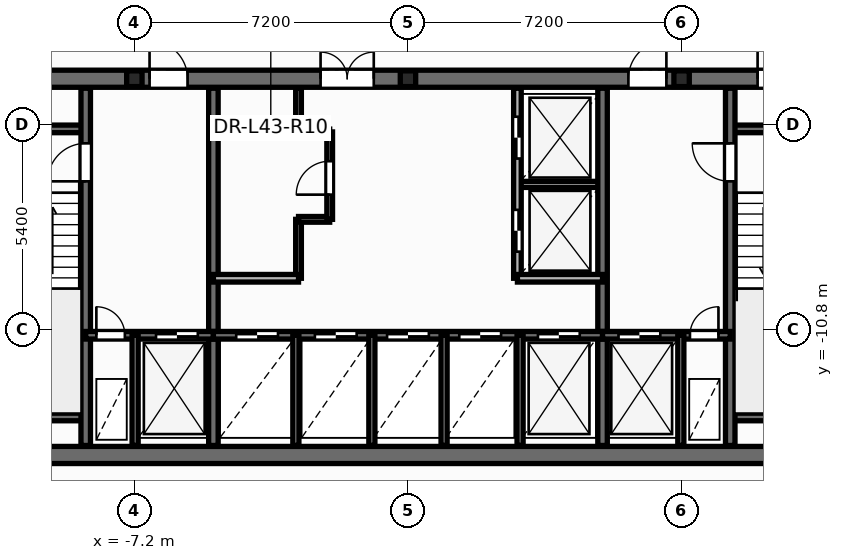
"""IFC4 building model, lengths in metres.
Left out: names, types, materials, properties, quantities, classifications, styles, units other than length and angle.
Written with IfcOpenShell. Run it as: python <this file> out.ifc"""

import sys

from ifc_helpers import new_model, si_unit, direction, frame, frame_2d, origin, origin_2d, place, context, subcontext, project, spatial, rectangle, i_section, extrude, element, fill, save


model = new_model("IFC4")
c1 = context("Model", 3, precision=1e-05, world=origin(), true_north=direction((0.0, 1.0)))
c2 = subcontext(c1, "Body", "Model", "MODEL_VIEW")
j1 = project(units=[si_unit("LENGTHUNIT", "METRE"), si_unit("PLANEANGLEUNIT", "RADIAN")], contexts=[c1])
p1 = place(None, origin())
s1 = spatial("IfcSite", under=j1, at=p1, CompositionType="ELEMENT")
p2 = place(p1, origin())
s2 = spatial("IfcBuilding", under=s1, at=p2, CompositionType="ELEMENT")
p3 = place(p2, frame((0.0, 0.0, 165.3)))
s3 = spatial("IfcBuildingStorey", under=s2, at=p3, CompositionType="ELEMENT", Elevation=165.3)
for number, where, z_axis, x_axis in (
    (1, (-7.2, -4.2, 0.0), (0.0, 0.0, 1.0), (1.0, 0.0, 0.0)),
    (2, (0.0, -4.2, 0.0), (0.0, 0.0, 1.0), (1.0, 0.0, 0.0)),
    (3, (7.2, -4.2, 0.0), (0.0, 0.0, 1.0), (1.0, 0.0, 0.0)),
):
    element("IfcColumn", number, at=place(p3, frame(where, z_axis=z_axis, x_axis=x_axis)), inside=s3, PredefinedType="PILASTER", context=c2, shape_type="SweptSolid", body=[
        extrude(i_section(OverallWidth=0.405, OverallDepth=0.414, WebThickness=0.022, FlangeThickness=0.032, at=origin_2d()), origin(), (0.0, 0.0, 1.0), 3.6),
    ])
p4 = place(p3, frame((-2.88, -9.45, 0.0), z_axis=(0.0, 0.0, 1.0), x_axis=(0.0, 1.0, 0.0)))
e4 = element("IfcWall", 4, at=p4, inside=s3, PredefinedType="PARTITIONING", context=c2, shape_type="SweptSolid", body=[
    extrude(rectangle(XDim=1.55, YDim=0.15, at=frame_2d((0.775, 0.0))), origin(), (0.0, 0.0, 1.0), 3.28),
])
p5 = place(p3, frame((-2.88, -7.9, 0.0), z_axis=(0.0, 0.0, 1.0), x_axis=(1.0, 0.0, 0.0)))
e5 = element("IfcWall", 5, at=p5, inside=s3, PredefinedType="PARTITIONING", context=c2, shape_type="SweptSolid", body=[
    extrude(rectangle(XDim=0.82, YDim=0.15, at=frame_2d((0.41, 0.0))), origin(), (0.0, 0.0, 1.0), 3.28),
])
p6 = place(p3, frame((-2.06, -7.9, 0.0), z_axis=(0.0, 0.0, 1.0), x_axis=(0.0, 1.0, 0.0)))
e6 = element("IfcWall", 6, at=p6, inside=s3, PredefinedType="PARTITIONING", context=c2, shape_type="SweptSolid", body=[
    extrude(rectangle(XDim=2.3, YDim=0.15, at=frame_2d((1.15, 0.0))), origin(), (0.0, 0.0, 1.0), 3.28),
])
p7 = place(p6, frame((0.65, 0.0, 0.0)))
e7 = element("IfcOpeningElement", 7, at=p7, cuts=e6, PredefinedType="OPENING", context=c2, shape_type="SweptSolid", body=[
    extrude(rectangle(XDim=0.886, YDim=2.104, at=frame_2d((0.44, 1.052))), frame((0.0, 0.085, 0.0), z_axis=(0.0, -1.0, 0.0), x_axis=(1.0, 0.0, 0.0)), (0.0, 0.0, 1.0), 0.17),
])
p8 = place(p3, frame((-2.88, -5.6, 0.0), z_axis=(0.0, 0.0, 1.0), x_axis=(1.0, 0.0, 0.0)))
e8 = element("IfcWall", 8, at=p8, inside=s3, PredefinedType="PARTITIONING", context=c2, shape_type="SweptSolid", body=[
    extrude(rectangle(XDim=0.82, YDim=0.15, at=frame_2d((0.41, 0.0))), origin(), (0.0, 0.0, 1.0), 3.28),
])
p9 = place(p3, frame((-2.88, -5.6, 0.0), z_axis=(0.0, 0.0, 1.0), x_axis=(0.0, 1.0, 0.0)))
e9 = element("IfcWall", 9, at=p9, inside=s3, PredefinedType="PARTITIONING", context=c2, shape_type="SweptSolid", body=[
    extrude(rectangle(XDim=1.15, YDim=0.15, at=frame_2d((0.575, 0.0))), origin(), (0.0, 0.0, 1.0), 3.28),
])
p10 = place(p3, frame((2.88, -6.98, 0.0), z_axis=(0.0, 0.0, 1.0), x_axis=(1.0, 0.0, 0.0)))
e10 = element("IfcWall", 10, at=p10, inside=s3, PredefinedType="PARTITIONING", context=c2, shape_type="SweptSolid", body=[
    extrude(rectangle(XDim=2.24, YDim=0.16, at=frame_2d((1.12, 0.0))), origin(), (0.0, 0.0, 1.0), 3.28),
])
p11 = place(p3, frame((-12.65, -14.1, 0.0), z_axis=(0.0, 0.0, 1.0), x_axis=(1.0, 0.0, 0.0)))
e11 = element("IfcWall", 11, at=p11, inside=s3, PredefinedType="SHEAR", context=c2, shape_type="SweptSolid", body=[
    extrude(rectangle(XDim=25.3, YDim=0.45, at=frame_2d((12.65, 0.0))), origin(), (0.0, 0.0, 1.0), 3.6),
])
p12 = place(p3, frame((-12.65, -4.2, 0.0), z_axis=(0.0, 0.0, 1.0), x_axis=(1.0, 0.0, 0.0)))
e12 = element("IfcWall", 12, at=p12, inside=s3, PredefinedType="SHEAR", context=c2, shape_type="SweptSolid", body=[
    extrude(rectangle(XDim=25.3, YDim=0.45, at=frame_2d((12.65, 0.0))), origin(), (0.0, 0.0, 1.0), 3.6),
])
p13 = place(p12, frame((1.85, 0.0, 0.0)))
e13 = element("IfcOpeningElement", 13, at=p13, cuts=e12, PredefinedType="OPENING", context=c2, shape_type="SweptSolid", body=[
    extrude(rectangle(XDim=0.756, YDim=2.054, at=frame_2d((0.375, 1.027))), frame((0.0, 0.235, 0.0), z_axis=(0.0, -1.0, 0.0), x_axis=(1.0, 0.0, 0.0)), (0.0, 0.0, 1.0), 0.47),
])
p14 = place(p12, frame((21.85, 0.0, 0.0)))
e14 = element("IfcOpeningElement", 14, at=p14, cuts=e12, PredefinedType="OPENING", context=c2, shape_type="SweptSolid", body=[
    extrude(rectangle(XDim=0.756, YDim=2.054, at=frame_2d((0.375, 1.027))), frame((0.0, 0.235, 0.0), z_axis=(0.0, -1.0, 0.0), x_axis=(1.0, 0.0, 0.0)), (0.0, 0.0, 1.0), 0.47),
])
p15 = place(p12, frame((23.5, 0.0, 0.0)))
e15 = element("IfcOpeningElement", 15, at=p15, cuts=e12, PredefinedType="OPENING", context=c2, shape_type="SweptSolid", body=[
    extrude(rectangle(XDim=0.756, YDim=2.054, at=frame_2d((0.375, 1.027))), frame((0.0, 0.235, 0.0), z_axis=(0.0, -1.0, 0.0), x_axis=(1.0, 0.0, 0.0)), (0.0, 0.0, 1.0), 0.47),
])
p16 = place(p12, frame((5.85, 0.0, 0.0)))
e16 = element("IfcOpeningElement", 16, at=p16, cuts=e12, PredefinedType="OPENING", context=c2, shape_type="SweptSolid", body=[
    extrude(rectangle(XDim=1.006, YDim=2.104, at=frame_2d((0.5, 1.052))), frame((0.0, 0.235, 0.0), z_axis=(0.0, -1.0, 0.0), x_axis=(1.0, 0.0, 0.0)), (0.0, 0.0, 1.0), 0.47),
])
p17 = place(p12, frame((10.35, 0.0, 0.0)))
e17 = element("IfcOpeningElement", 17, at=p17, cuts=e12, PredefinedType="OPENING", context=c2, shape_type="SweptSolid", body=[
    extrude(rectangle(XDim=1.406, YDim=2.154, at=frame_2d((0.7, 1.077))), frame((0.0, 0.235, 0.0), z_axis=(0.0, -1.0, 0.0), x_axis=(1.0, 0.0, 0.0)), (0.0, 0.0, 1.0), 0.47),
])
p18 = place(p12, frame((18.45, 0.0, 0.0)))
e18 = element("IfcOpeningElement", 18, at=p18, cuts=e12, PredefinedType="OPENING", context=c2, shape_type="SweptSolid", body=[
    extrude(rectangle(XDim=1.006, YDim=2.104, at=frame_2d((0.5, 1.052))), frame((0.0, 0.235, 0.0), z_axis=(0.0, -1.0, 0.0), x_axis=(1.0, 0.0, 0.0)), (0.0, 0.0, 1.0), 0.47),
])
for number, where, z_axis, x_axis in (
    (19, (-12.35, -5.52, 0.0), (0.0, 0.0, 1.0), (1.0, 0.0, 0.0)),
    (20, (-12.35, -13.1, 0.0), (0.0, 0.0, 1.0), (1.0, 0.0, 0.0)),
    (21, (8.48, -5.52, 0.0), (0.0, 0.0, 1.0), (1.0, 0.0, 0.0)),
    (22, (8.48, -13.1, 0.0), (0.0, 0.0, 1.0), (1.0, 0.0, 0.0)),
):
    element("IfcWall", number, at=place(p3, frame(where, z_axis=z_axis, x_axis=x_axis)), inside=s3, PredefinedType="SOLIDWALL", context=c2, shape_type="SweptSolid", body=[
        extrude(rectangle(XDim=3.87, YDim=0.2, at=frame_2d((1.935, 0.0))), origin(), (0.0, 0.0, 1.0), 3.6),
    ])
p19 = place(p3, frame((-8.48, -13.85, 0.0), z_axis=(0.0, 0.0, 1.0), x_axis=(0.0, 1.0, 0.0)))
e23 = element("IfcWall", 23, at=p19, inside=s3, PredefinedType="SHEAR", context=c2, shape_type="SweptSolid", body=[
    extrude(rectangle(XDim=9.4, YDim=0.25, at=frame_2d((4.7, 0.0))), origin(), (0.0, 0.0, 1.0), 3.6),
])
p20 = place(p19, frame((6.95, 0.0, 0.0)))
e24 = element("IfcOpeningElement", 24, at=p20, cuts=e23, PredefinedType="OPENING", context=c2, shape_type="SweptSolid", body=[
    extrude(rectangle(XDim=1.006, YDim=2.104, at=frame_2d((0.5, 1.052))), frame((0.0, 0.135, 0.0), z_axis=(0.0, -1.0, 0.0), x_axis=(1.0, 0.0, 0.0)), (0.0, 0.0, 1.0), 0.27),
])
p21 = place(p3, frame((8.48, -13.85, 0.0), z_axis=(0.0, 0.0, 1.0), x_axis=(0.0, 1.0, 0.0)))
e25 = element("IfcWall", 25, at=p21, inside=s3, PredefinedType="SHEAR", context=c2, shape_type="SweptSolid", body=[
    extrude(rectangle(XDim=9.4, YDim=0.25, at=frame_2d((4.7, 0.0))), origin(), (0.0, 0.0, 1.0), 3.6),
])
p22 = place(p21, frame((6.95, 0.0, 0.0)))
e26 = element("IfcOpeningElement", 26, at=p22, cuts=e25, PredefinedType="OPENING", context=c2, shape_type="SweptSolid", body=[
    extrude(rectangle(XDim=1.006, YDim=2.104, at=frame_2d((0.5, 1.052))), frame((0.0, 0.135, 0.0), z_axis=(0.0, -1.0, 0.0), x_axis=(1.0, 0.0, 0.0)), (0.0, 0.0, 1.0), 0.27),
])
for number, where, z_axis, x_axis in (
    (27, (-5.12, -13.85, 0.0), (0.0, 0.0, 1.0), (0.0, 1.0, 0.0)),
    (28, (5.12, -13.85, 0.0), (0.0, 0.0, 1.0), (0.0, 1.0, 0.0)),
):
    element("IfcWall", number, at=place(p3, frame(where, z_axis=z_axis, x_axis=x_axis)), inside=s3, PredefinedType="SHEAR", context=c2, shape_type="SweptSolid", body=[
        extrude(rectangle(XDim=9.4, YDim=0.25, at=frame_2d((4.7, 0.0))), origin(), (0.0, 0.0, 1.0), 3.6),
    ])
p23 = place(p3, frame((-8.48, -10.95, 0.0), z_axis=(0.0, 0.0, 1.0), x_axis=(1.0, 0.0, 0.0)))
e29 = element("IfcWall", 29, at=p23, inside=s3, PredefinedType="SOLIDWALL", context=c2, shape_type="SweptSolid", body=[
    extrude(rectangle(XDim=3.36, YDim=0.2, at=frame_2d((1.68, 0.0))), origin(), (0.0, 0.0, 1.0), 3.6),
])
p24 = place(p23, frame((0.28, 0.0, 0.0)))
e30 = element("IfcOpeningElement", 30, at=p24, cuts=e29, PredefinedType="OPENING", context=c2, shape_type="SweptSolid", body=[
    extrude(rectangle(XDim=0.756, YDim=2.054, at=frame_2d((0.375, 1.027))), frame((0.0, 0.11, 0.0), z_axis=(0.0, -1.0, 0.0), x_axis=(1.0, 0.0, 0.0)), (0.0, 0.0, 1.0), 0.22),
])
p25 = place(p23, frame((1.85, 0.0, 0.0)))
e31 = element("IfcOpeningElement", 31, at=p25, cuts=e29, PredefinedType="OPENING", context=c2, shape_type="SweptSolid", body=[
    extrude(rectangle(XDim=1.106, YDim=2.104, at=frame_2d((0.55, 1.052))), frame((0.0, 0.11, 0.0), z_axis=(0.0, -1.0, 0.0), x_axis=(1.0, 0.0, 0.0)), (0.0, 0.0, 1.0), 0.22),
])
p26 = place(p3, frame((-5.12, -10.95, 0.0), z_axis=(0.0, 0.0, 1.0), x_axis=(1.0, 0.0, 0.0)))
e32 = element("IfcWall", 32, at=p26, inside=s3, PredefinedType="SOLIDWALL", context=c2, shape_type="SweptSolid", body=[
    extrude(rectangle(XDim=10.24, YDim=0.2, at=frame_2d((5.12, 0.0))), origin(), (0.0, 0.0, 1.0), 3.6),
])
p27 = place(p26, frame((0.6, 0.0, 0.0)))
e33 = element("IfcOpeningElement", 33, at=p27, cuts=e32, PredefinedType="OPENING", context=c2, shape_type="SweptSolid", body=[
    extrude(rectangle(XDim=1.106, YDim=2.104, at=frame_2d((0.55, 1.052))), frame((0.0, 0.11, 0.0), z_axis=(0.0, -1.0, 0.0), x_axis=(1.0, 0.0, 0.0)), (0.0, 0.0, 1.0), 0.22),
])
p28 = place(p26, frame((2.67, 0.0, 0.0)))
e34 = element("IfcOpeningElement", 34, at=p28, cuts=e32, PredefinedType="OPENING", context=c2, shape_type="SweptSolid", body=[
    extrude(rectangle(XDim=1.106, YDim=2.104, at=frame_2d((0.55, 1.052))), frame((0.0, 0.11, 0.0), z_axis=(0.0, -1.0, 0.0), x_axis=(1.0, 0.0, 0.0)), (0.0, 0.0, 1.0), 0.22),
])
p29 = place(p26, frame((4.57, 0.0, 0.0)))
e35 = element("IfcOpeningElement", 35, at=p29, cuts=e32, PredefinedType="OPENING", context=c2, shape_type="SweptSolid", body=[
    extrude(rectangle(XDim=1.106, YDim=2.104, at=frame_2d((0.55, 1.052))), frame((0.0, 0.11, 0.0), z_axis=(0.0, -1.0, 0.0), x_axis=(1.0, 0.0, 0.0)), (0.0, 0.0, 1.0), 0.22),
])
p30 = place(p26, frame((6.47, 0.0, 0.0)))
e36 = element("IfcOpeningElement", 36, at=p30, cuts=e32, PredefinedType="OPENING", context=c2, shape_type="SweptSolid", body=[
    extrude(rectangle(XDim=1.106, YDim=2.104, at=frame_2d((0.55, 1.052))), frame((0.0, 0.11, 0.0), z_axis=(0.0, -1.0, 0.0), x_axis=(1.0, 0.0, 0.0)), (0.0, 0.0, 1.0), 0.22),
])
p31 = place(p26, frame((8.54, 0.0, 0.0)))
e37 = element("IfcOpeningElement", 37, at=p31, cuts=e32, PredefinedType="OPENING", context=c2, shape_type="SweptSolid", body=[
    extrude(rectangle(XDim=1.106, YDim=2.104, at=frame_2d((0.55, 1.052))), frame((0.0, 0.11, 0.0), z_axis=(0.0, -1.0, 0.0), x_axis=(1.0, 0.0, 0.0)), (0.0, 0.0, 1.0), 0.22),
])
p32 = place(p3, frame((5.12, -10.95, 0.0), z_axis=(0.0, 0.0, 1.0), x_axis=(1.0, 0.0, 0.0)))
e38 = element("IfcWall", 38, at=p32, inside=s3, PredefinedType="SOLIDWALL", context=c2, shape_type="SweptSolid", body=[
    extrude(rectangle(XDim=3.36, YDim=0.2, at=frame_2d((1.68, 0.0))), origin(), (0.0, 0.0, 1.0), 3.6),
])
p33 = place(p32, frame((0.42, 0.0, 0.0)))
e39 = element("IfcOpeningElement", 39, at=p33, cuts=e38, PredefinedType="OPENING", context=c2, shape_type="SweptSolid", body=[
    extrude(rectangle(XDim=1.106, YDim=2.104, at=frame_2d((0.55, 1.052))), frame((0.0, 0.11, 0.0), z_axis=(0.0, -1.0, 0.0), x_axis=(1.0, 0.0, 0.0)), (0.0, 0.0, 1.0), 0.22),
])
p34 = place(p32, frame((2.3, 0.0, 0.0)))
e40 = element("IfcOpeningElement", 40, at=p34, cuts=e38, PredefinedType="OPENING", context=c2, shape_type="SweptSolid", body=[
    extrude(rectangle(XDim=0.756, YDim=2.054, at=frame_2d((0.375, 1.027))), frame((0.0, 0.11, 0.0), z_axis=(0.0, -1.0, 0.0), x_axis=(1.0, 0.0, 0.0)), (0.0, 0.0, 1.0), 0.22),
])
for number, where, z_axis, x_axis in (
    (41, (-7.18, -13.85, 0.0), (0.0, 0.0, 1.0), (0.0, 1.0, 0.0)),
    (42, (7.18, -13.85, 0.0), (0.0, 0.0, 1.0), (0.0, 1.0, 0.0)),
    (43, (-2.95, -13.85, 0.0), (0.0, 0.0, 1.0), (0.0, 1.0, 0.0)),
    (44, (2.95, -13.85, 0.0), (0.0, 0.0, 1.0), (0.0, 1.0, 0.0)),
):
    element("IfcWall", number, at=place(p3, frame(where, z_axis=z_axis, x_axis=x_axis)), inside=s3, PredefinedType="PARTITIONING", context=c2, shape_type="SweptSolid", body=[
        extrude(rectangle(XDim=2.9, YDim=0.16, at=frame_2d((1.45, 0.0))), origin(), (0.0, 0.0, 1.0), 2.405),
    ])
p35 = place(p3, frame((-5.12, -9.45, 0.0), z_axis=(0.0, 0.0, 1.0), x_axis=(1.0, 0.0, 0.0)))
e45 = element("IfcWall", 45, at=p35, inside=s3, PredefinedType="SOLIDWALL", context=c2, shape_type="SweptSolid", body=[
    extrude(rectangle(XDim=2.24, YDim=0.2, at=frame_2d((1.12, 0.0))), origin(), (0.0, 0.0, 1.0), 3.28),
])
p36 = place(p3, frame((2.88, -9.45, 0.0), z_axis=(0.0, 0.0, 1.0), x_axis=(0.0, 1.0, 0.0)))
e46 = element("IfcWall", 46, at=p36, inside=s3, PredefinedType="SOLIDWALL", context=c2, shape_type="SweptSolid", body=[
    extrude(rectangle(XDim=5.0, YDim=0.2, at=frame_2d((2.5, 0.0))), origin(), (0.0, 0.0, 1.0), 3.28),
])
p37 = place(p36, frame((0.7, 0.0, 0.0)))
e47 = element("IfcOpeningElement", 47, at=p37, cuts=e46, PredefinedType="OPENING", context=c2, shape_type="SweptSolid", body=[
    extrude(rectangle(XDim=1.106, YDim=2.104, at=frame_2d((0.55, 1.052))), frame((0.0, 0.11, 0.0), z_axis=(0.0, -1.0, 0.0), x_axis=(1.0, 0.0, 0.0)), (0.0, 0.0, 1.0), 0.22),
])
p38 = place(p36, frame((3.15, 0.0, 0.0)))
e48 = element("IfcOpeningElement", 48, at=p38, cuts=e46, PredefinedType="OPENING", context=c2, shape_type="SweptSolid", body=[
    extrude(rectangle(XDim=1.106, YDim=2.104, at=frame_2d((0.55, 1.052))), frame((0.0, 0.11, 0.0), z_axis=(0.0, -1.0, 0.0), x_axis=(1.0, 0.0, 0.0)), (0.0, 0.0, 1.0), 0.22),
])
p39 = place(p3, frame((2.88, -9.45, 0.0), z_axis=(0.0, 0.0, 1.0), x_axis=(1.0, 0.0, 0.0)))
e49 = element("IfcWall", 49, at=p39, inside=s3, PredefinedType="SOLIDWALL", context=c2, shape_type="SweptSolid", body=[
    extrude(rectangle(XDim=2.24, YDim=0.2, at=frame_2d((1.12, 0.0))), origin(), (0.0, 0.0, 1.0), 3.28),
])
for number, where, z_axis, x_axis in (
    (50, (-0.95, -13.85, 0.0), (0.0, 0.0, 1.0), (0.0, 1.0, 0.0)),
    (51, (0.95, -13.85, 0.0), (0.0, 0.0, 1.0), (0.0, 1.0, 0.0)),
):
    element("IfcWall", number, at=place(p3, frame(where, z_axis=z_axis, x_axis=x_axis)), inside=s3, PredefinedType="PARTITIONING", context=c2, shape_type="SweptSolid", body=[
        extrude(rectangle(XDim=2.9, YDim=0.16, at=frame_2d((1.45, 0.0))), origin(), (0.0, 0.0, 1.0), 2.405),
    ])
p40 = place(p7, origin())
e52 = element("IfcDoor", 52, at=p40, inside=s3, OperationType="SINGLE_SWING_LEFT", PredefinedType="DOOR", context=c2, shape_type="SweptSolid", body=[
    extrude(rectangle(XDim=0.88, YDim=2.1, at=frame_2d((0.44, 1.05))), frame((0.0, 0.025, 0.0), z_axis=(0.0, -1.0, 0.0), x_axis=(1.0, 0.0, 0.0)), (0.0, 0.0, 1.0), 0.05),
])
fill(e7, e52)
p41 = place(p37, origin())
e53 = element("IfcDoor", 53, at=p41, inside=s3, OperationType="DOUBLE_DOOR_SLIDING", PredefinedType="DOOR", context=c2, shape_type="SweptSolid", body=[
    extrude(rectangle(XDim=1.1, YDim=2.1, at=frame_2d((0.55, 1.05))), frame((0.0, 0.025, 0.0), z_axis=(0.0, -1.0, 0.0), x_axis=(1.0, 0.0, 0.0)), (0.0, 0.0, 1.0), 0.05),
])
fill(e47, e53)
p42 = place(p38, origin())
e54 = element("IfcDoor", 54, at=p42, inside=s3, OperationType="DOUBLE_DOOR_SLIDING", PredefinedType="DOOR", context=c2, shape_type="SweptSolid", body=[
    extrude(rectangle(XDim=1.1, YDim=2.1, at=frame_2d((0.55, 1.05))), frame((0.0, 0.025, 0.0), z_axis=(0.0, -1.0, 0.0), x_axis=(1.0, 0.0, 0.0)), (0.0, 0.0, 1.0), 0.05),
])
fill(e48, e54)
p43 = place(p20, origin())
e55 = element("IfcDoor", 55, at=p43, inside=s3, OperationType="SINGLE_SWING_LEFT", PredefinedType="DOOR", context=c2, shape_type="SweptSolid", body=[
    extrude(rectangle(XDim=1.0, YDim=2.1, at=frame_2d((0.5, 1.05))), frame((0.0, 0.025, 0.0), z_axis=(0.0, -1.0, 0.0), x_axis=(1.0, 0.0, 0.0)), (0.0, 0.0, 1.0), 0.05),
])
fill(e24, e55)
p44 = place(p22, origin())
e56 = element("IfcDoor", 56, at=p44, inside=s3, OperationType="SINGLE_SWING_RIGHT", PredefinedType="DOOR", context=c2, shape_type="SweptSolid", body=[
    extrude(rectangle(XDim=1.0, YDim=2.1, at=frame_2d((0.5, 1.05))), frame((0.0, 0.025, 0.0), z_axis=(0.0, -1.0, 0.0), x_axis=(1.0, 0.0, 0.0)), (0.0, 0.0, 1.0), 0.05),
])
fill(e26, e56)
p45 = place(p24, origin())
e57 = element("IfcDoor", 57, at=p45, inside=s3, OperationType="SINGLE_SWING_LEFT", PredefinedType="DOOR", context=c2, shape_type="SweptSolid", body=[
    extrude(rectangle(XDim=0.75, YDim=2.05, at=frame_2d((0.375, 1.025))), frame((0.0, 0.025, 0.0), z_axis=(0.0, -1.0, 0.0), x_axis=(1.0, 0.0, 0.0)), (0.0, 0.0, 1.0), 0.05),
])
fill(e30, e57)
p46 = place(p25, origin())
e58 = element("IfcDoor", 58, at=p46, inside=s3, OperationType="DOUBLE_DOOR_SLIDING", PredefinedType="DOOR", context=c2, shape_type="SweptSolid", body=[
    extrude(rectangle(XDim=1.1, YDim=2.1, at=frame_2d((0.55, 1.05))), frame((0.0, 0.025, 0.0), z_axis=(0.0, -1.0, 0.0), x_axis=(1.0, 0.0, 0.0)), (0.0, 0.0, 1.0), 0.05),
])
fill(e31, e58)
p47 = place(p33, origin())
e59 = element("IfcDoor", 59, at=p47, inside=s3, OperationType="DOUBLE_DOOR_SLIDING", PredefinedType="DOOR", context=c2, shape_type="SweptSolid", body=[
    extrude(rectangle(XDim=1.1, YDim=2.1, at=frame_2d((0.55, 1.05))), frame((0.0, 0.025, 0.0), z_axis=(0.0, -1.0, 0.0), x_axis=(1.0, 0.0, 0.0)), (0.0, 0.0, 1.0), 0.05),
])
fill(e39, e59)
p48 = place(p34, origin())
e60 = element("IfcDoor", 60, at=p48, inside=s3, OperationType="SINGLE_SWING_RIGHT", PredefinedType="DOOR", context=c2, shape_type="SweptSolid", body=[
    extrude(rectangle(XDim=0.75, YDim=2.05, at=frame_2d((0.375, 1.025))), frame((0.0, 0.025, 0.0), z_axis=(0.0, -1.0, 0.0), x_axis=(1.0, 0.0, 0.0)), (0.0, 0.0, 1.0), 0.05),
])
fill(e40, e60)
p49 = place(p27, origin())
e61 = element("IfcDoor", 61, at=p49, inside=s3, OperationType="DOUBLE_DOOR_SLIDING", PredefinedType="DOOR", context=c2, shape_type="SweptSolid", body=[
    extrude(rectangle(XDim=1.1, YDim=2.1, at=frame_2d((0.55, 1.05))), frame((0.0, 0.025, 0.0), z_axis=(0.0, -1.0, 0.0), x_axis=(1.0, 0.0, 0.0)), (0.0, 0.0, 1.0), 0.05),
])
fill(e33, e61)
p50 = place(p28, origin())
e62 = element("IfcDoor", 62, at=p50, inside=s3, OperationType="DOUBLE_DOOR_SLIDING", PredefinedType="DOOR", context=c2, shape_type="SweptSolid", body=[
    extrude(rectangle(XDim=1.1, YDim=2.1, at=frame_2d((0.55, 1.05))), frame((0.0, 0.025, 0.0), z_axis=(0.0, -1.0, 0.0), x_axis=(1.0, 0.0, 0.0)), (0.0, 0.0, 1.0), 0.05),
])
fill(e34, e62)
p51 = place(p29, origin())
e63 = element("IfcDoor", 63, at=p51, inside=s3, OperationType="DOUBLE_DOOR_SLIDING", PredefinedType="DOOR", context=c2, shape_type="SweptSolid", body=[
    extrude(rectangle(XDim=1.1, YDim=2.1, at=frame_2d((0.55, 1.05))), frame((0.0, 0.025, 0.0), z_axis=(0.0, -1.0, 0.0), x_axis=(1.0, 0.0, 0.0)), (0.0, 0.0, 1.0), 0.05),
])
fill(e35, e63)
p52 = place(p30, origin())
e64 = element("IfcDoor", 64, at=p52, inside=s3, OperationType="DOUBLE_DOOR_SLIDING", PredefinedType="DOOR", context=c2, shape_type="SweptSolid", body=[
    extrude(rectangle(XDim=1.1, YDim=2.1, at=frame_2d((0.55, 1.05))), frame((0.0, 0.025, 0.0), z_axis=(0.0, -1.0, 0.0), x_axis=(1.0, 0.0, 0.0)), (0.0, 0.0, 1.0), 0.05),
])
fill(e36, e64)
p53 = place(p31, origin())
e65 = element("IfcDoor", 65, at=p53, inside=s3, OperationType="DOUBLE_DOOR_SLIDING", PredefinedType="DOOR", context=c2, shape_type="SweptSolid", body=[
    extrude(rectangle(XDim=1.1, YDim=2.1, at=frame_2d((0.55, 1.05))), frame((0.0, 0.025, 0.0), z_axis=(0.0, -1.0, 0.0), x_axis=(1.0, 0.0, 0.0)), (0.0, 0.0, 1.0), 0.05),
])
fill(e37, e65)
p54 = place(p14, origin())
e66 = element("IfcDoor", 66, at=p54, inside=s3, OperationType="SINGLE_SWING_LEFT", PredefinedType="DOOR", context=c2, shape_type="SweptSolid", body=[
    extrude(rectangle(XDim=0.75, YDim=2.05, at=frame_2d((0.375, 1.025))), frame((0.0, 0.025, 0.0), z_axis=(0.0, -1.0, 0.0), x_axis=(1.0, 0.0, 0.0)), (0.0, 0.0, 1.0), 0.05),
])
fill(e14, e66)
p55 = place(p16, origin())
e67 = element("IfcDoor", 67, at=p55, inside=s3, OperationType="SINGLE_SWING_LEFT", PredefinedType="DOOR", context=c2, shape_type="SweptSolid", body=[
    extrude(rectangle(XDim=1.0, YDim=2.1, at=frame_2d((0.5, 1.05))), frame((0.0, 0.025, 0.0), z_axis=(0.0, -1.0, 0.0), x_axis=(1.0, 0.0, 0.0)), (0.0, 0.0, 1.0), 0.05),
])
fill(e16, e67)
p56 = place(p17, origin())
e68 = element("IfcDoor", 68, at=p56, inside=s3, OperationType="DOUBLE_DOOR_SINGLE_SWING", PredefinedType="DOOR", context=c2, shape_type="SweptSolid", body=[
    extrude(rectangle(XDim=1.4, YDim=2.15, at=frame_2d((0.7, 1.075))), frame((0.0, 0.025, 0.0), z_axis=(0.0, -1.0, 0.0), x_axis=(1.0, 0.0, 0.0)), (0.0, 0.0, 1.0), 0.05),
])
fill(e17, e68)
p57 = place(p18, origin())
e69 = element("IfcDoor", 69, at=p57, inside=s3, OperationType="SINGLE_SWING_RIGHT", PredefinedType="DOOR", context=c2, shape_type="SweptSolid", body=[
    extrude(rectangle(XDim=1.0, YDim=2.1, at=frame_2d((0.5, 1.05))), frame((0.0, 0.025, 0.0), z_axis=(0.0, -1.0, 0.0), x_axis=(1.0, 0.0, 0.0)), (0.0, 0.0, 1.0), 0.05),
])
fill(e18, e69)
save(model, sys.argv[1])
